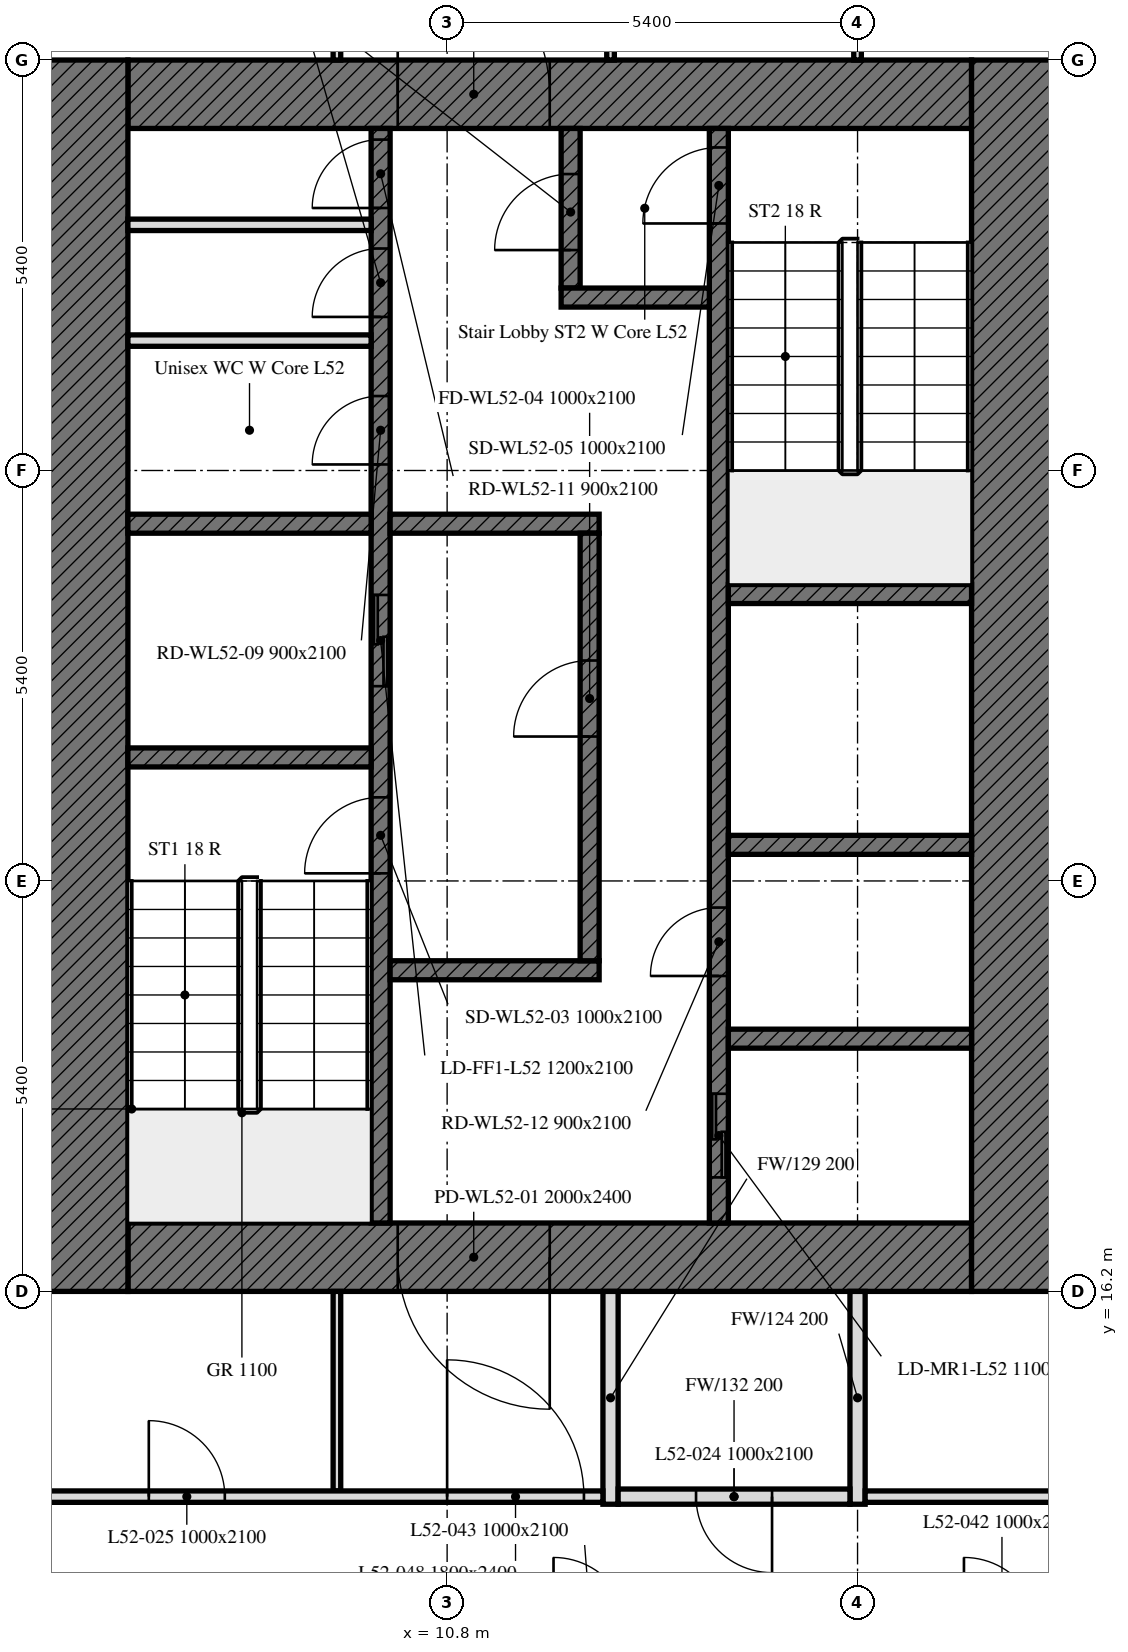
"""IFC4 building model, lengths in metres.
Left out: names, types, materials, properties, quantities, classifications, styles, units other than length and angle.
Written with IfcOpenShell. Run it as: python <this file> out.ifc"""

import sys

from ifc_helpers import new_model, si_unit, direction, frame, frame_2d, origin, place, context, subcontext, project, spatial, rectangle, extrude, element, fill, save


model = new_model("IFC4")
c1 = context("Model", 3, precision=1e-05, world=origin(), true_north=direction((0.0, 1.0)))
c2 = subcontext(c1, "Body", "Model", "MODEL_VIEW")
j1 = project(units=[si_unit("LENGTHUNIT", "METRE"), si_unit("PLANEANGLEUNIT", "RADIAN")], contexts=[c1])
p1 = place(None, origin())
s1 = spatial("IfcSite", under=j1, at=p1, CompositionType="ELEMENT")
p2 = place(p1, origin())
s2 = spatial("IfcBuilding", under=s1, at=p2, CompositionType="ELEMENT")
p3 = place(p2, frame((0.0, 0.0, 210.4)))
s3 = spatial("IfcBuildingStorey", under=s2, at=p3, CompositionType="ELEMENT", Elevation=210.4)
p4 = place(p3, frame((17.7, 16.65, 0.0), z_axis=(0.0, 0.0, 1.0), x_axis=(-1.0, 0.0, 0.0)))
e1 = element("IfcWall", 1, at=p4, inside=s3, PredefinedType="SOLIDWALL", context=c2, shape_type="SweptSolid", body=[
    extrude(rectangle(XDim=11.1, YDim=0.9, at=frame_2d((5.55, 0.0))), origin(), (0.0, 0.0, 1.0), 3.0),
])
p5 = place(p4, frame((5.55, 0.0, 0.0)))
e2 = element("IfcOpeningElement", 2, at=p5, cuts=e1, PredefinedType="OPENING", context=c2, shape_type="SweptSolid", body=[
    extrude(rectangle(XDim=2.0, YDim=2.4, at=frame_2d((1.0, 1.2))), frame((0.0, 0.45, 0.0), z_axis=(0.0, -1.0, 0.0), x_axis=(1.0, 0.0, 0.0)), (0.0, 0.0, 1.0), 0.9),
])
p6 = place(p3, frame((6.6, 31.95, 0.0), z_axis=(0.0, 0.0, 1.0), x_axis=(1.0, 0.0, 0.0)))
e3 = element("IfcWall", 3, at=p6, inside=s3, PredefinedType="SOLIDWALL", context=c2, shape_type="SweptSolid", body=[
    extrude(rectangle(XDim=11.1, YDim=0.9, at=frame_2d((5.55, 0.0))), origin(), (0.0, 0.0, 1.0), 3.0),
])
p7 = place(p6, frame((3.55, 0.0, 0.0)))
e4 = element("IfcOpeningElement", 4, at=p7, cuts=e3, PredefinedType="OPENING", context=c2, shape_type="SweptSolid", body=[
    extrude(rectangle(XDim=2.0, YDim=2.4, at=frame_2d((1.0, 1.2))), frame((0.0, 0.45, 0.0), z_axis=(0.0, -1.0, 0.0), x_axis=(1.0, 0.0, 0.0)), (0.0, 0.0, 1.0), 0.9),
])
for number, where, z_axis, x_axis in (
    (5, (6.0, 16.2, 0.0), (0.0, 0.0, 1.0), (0.0, 1.0, 0.0)),
    (6, (18.3, 32.4, 0.0), (0.0, 0.0, 1.0), (0.0, -1.0, 0.0)),
):
    element("IfcWall", number, at=place(p3, frame(where, z_axis=z_axis, x_axis=x_axis)), inside=s3, PredefinedType="SOLIDWALL", context=c2, shape_type="SweptSolid", body=[
        extrude(rectangle(XDim=16.2, YDim=1.2, at=frame_2d((8.1, 0.0))), origin(), (0.0, 0.0, 1.0), 3.0),
    ])
p8 = place(p3, frame((9.925, 17.1, 0.0), z_axis=(0.0, 0.0, 1.0), x_axis=(0.0, 1.0, 0.0)))
e7 = element("IfcWall", 7, at=p8, inside=s3, PredefinedType="SOLIDWALL", context=c2, shape_type="SweptSolid", body=[
    extrude(rectangle(XDim=14.4, YDim=0.25, at=frame_2d((7.2, 0.0))), origin(), (0.0, 0.0, 1.0), 3.0),
])
p9 = place(p8, frame((4.6, 0.0, 0.0)))
e8 = element("IfcOpeningElement", 8, at=p9, cuts=e7, PredefinedType="OPENING", context=c2, shape_type="SweptSolid", body=[
    extrude(rectangle(XDim=1.0, YDim=2.1, at=frame_2d((0.5, 1.05))), frame((0.0, 0.125, 0.0), z_axis=(0.0, -1.0, 0.0), x_axis=(1.0, 0.0, 0.0)), (0.0, 0.0, 1.0), 0.25),
])
p10 = place(p8, frame((7.062, 0.0, 0.0)))
e9 = element("IfcOpeningElement", 9, at=p10, cuts=e7, PredefinedType="OPENING", context=c2, shape_type="SweptSolid", body=[
    extrude(rectangle(XDim=1.2, YDim=2.1, at=frame_2d((0.6, 1.05))), frame((0.0, 0.125, 0.0), z_axis=(0.0, -1.0, 0.0), x_axis=(1.0, 0.0, 0.0)), (0.0, 0.0, 1.0), 0.25),
])
p11 = place(p8, frame((9.979, 0.0, 0.0)))
e10 = element("IfcOpeningElement", 10, at=p11, cuts=e7, PredefinedType="OPENING", context=c2, shape_type="SweptSolid", body=[
    extrude(rectangle(XDim=0.9, YDim=2.1, at=frame_2d((0.45, 1.05))), frame((0.0, 0.125, 0.0), z_axis=(0.0, -1.0, 0.0), x_axis=(1.0, 0.0, 0.0)), (0.0, 0.0, 1.0), 0.25),
])
p12 = place(p8, frame((11.92, 0.0, 0.0)))
e11 = element("IfcOpeningElement", 11, at=p12, cuts=e7, PredefinedType="OPENING", context=c2, shape_type="SweptSolid", body=[
    extrude(rectangle(XDim=0.9, YDim=2.1, at=frame_2d((0.45, 1.05))), frame((0.0, 0.125, 0.0), z_axis=(0.0, -1.0, 0.0), x_axis=(1.0, 0.0, 0.0)), (0.0, 0.0, 1.0), 0.25),
])
p13 = place(p8, frame((13.354, 0.0, 0.0)))
e12 = element("IfcOpeningElement", 12, at=p13, cuts=e7, PredefinedType="OPENING", context=c2, shape_type="SweptSolid", body=[
    extrude(rectangle(XDim=0.9, YDim=2.1, at=frame_2d((0.45, 1.05))), frame((0.0, 0.125, 0.0), z_axis=(0.0, -1.0, 0.0), x_axis=(1.0, 0.0, 0.0)), (0.0, 0.0, 1.0), 0.25),
])
p14 = place(p3, frame((14.375, 17.1, 0.0), z_axis=(0.0, 0.0, 1.0), x_axis=(0.0, 1.0, 0.0)))
e13 = element("IfcWall", 13, at=p14, inside=s3, PredefinedType="SOLIDWALL", context=c2, shape_type="SweptSolid", body=[
    extrude(rectangle(XDim=14.4, YDim=0.25, at=frame_2d((7.2, 0.0))), origin(), (0.0, 0.0, 1.0), 3.0),
])
p15 = place(p14, frame((13.15, 0.0, 0.0)))
e14 = element("IfcOpeningElement", 14, at=p15, cuts=e13, PredefinedType="OPENING", context=c2, shape_type="SweptSolid", body=[
    extrude(rectangle(XDim=1.0, YDim=2.1, at=frame_2d((0.5, 1.05))), frame((0.0, 0.125, 0.0), z_axis=(0.0, -1.0, 0.0), x_axis=(1.0, 0.0, 0.0)), (0.0, 0.0, 1.0), 0.25),
])
p16 = place(p14, frame((0.6, 0.0, 0.0)))
e15 = element("IfcOpeningElement", 15, at=p16, cuts=e13, PredefinedType="OPENING", context=c2, shape_type="SweptSolid", body=[
    extrude(rectangle(XDim=1.1, YDim=2.1, at=frame_2d((0.55, 1.05))), frame((0.0, 0.125, 0.0), z_axis=(0.0, -1.0, 0.0), x_axis=(1.0, 0.0, 0.0)), (0.0, 0.0, 1.0), 0.25),
])
p17 = place(p14, frame((3.25, 0.0, 0.0)))
e16 = element("IfcOpeningElement", 16, at=p17, cuts=e13, PredefinedType="OPENING", context=c2, shape_type="SweptSolid", body=[
    extrude(rectangle(XDim=0.9, YDim=2.1, at=frame_2d((0.45, 1.05))), frame((0.0, 0.125, 0.0), z_axis=(0.0, -1.0, 0.0), x_axis=(1.0, 0.0, 0.0)), (0.0, 0.0, 1.0), 0.25),
])
for number, where, z_axis, x_axis in (
    (17, (6.6, 23.225, 0.0), (0.0, 0.0, 1.0), (1.0, 0.0, 0.0)),
    (18, (14.5, 25.375, 0.0), (0.0, 0.0, 1.0), (1.0, 0.0, 0.0)),
    (19, (14.5, 22.075, 0.0), (0.0, 0.0, 1.0), (1.0, 0.0, 0.0)),
    (20, (6.6, 26.3, 0.0), (0.0, 0.0, 1.0), (1.0, 0.0, 0.0)),
):
    element("IfcWall", number, at=place(p3, frame(where, z_axis=z_axis, x_axis=x_axis)), inside=s3, PredefinedType="SOLIDWALL", context=c2, shape_type="SweptSolid", body=[
        extrude(rectangle(XDim=3.2, YDim=0.25, at=frame_2d((1.6, 0.0))), origin(), (0.0, 0.0, 1.0), 3.0),
    ])
for number, where, z_axis, x_axis in (
    (21, (10.05, 26.3, 0.0), (0.0, 0.0, 1.0), (1.0, 0.0, 0.0)),
    (22, (10.05, 20.425, 0.0), (0.0, 0.0, 1.0), (1.0, 0.0, 0.0)),
):
    element("IfcWall", number, at=place(p3, frame(where, z_axis=z_axis, x_axis=x_axis)), inside=s3, PredefinedType="SOLIDWALL", context=c2, shape_type="SweptSolid", body=[
        extrude(rectangle(XDim=2.75, YDim=0.25, at=frame_2d((1.375, 0.0))), origin(), (0.0, 0.0, 1.0), 3.0),
    ])
p18 = place(p3, frame((12.425, 29.4, 0.0), z_axis=(0.0, 0.0, 1.0), x_axis=(0.0, 1.0, 0.0)))
e23 = element("IfcWall", 23, at=p18, inside=s3, PredefinedType="SOLIDWALL", context=c2, shape_type="SweptSolid", body=[
    extrude(rectangle(XDim=2.1, YDim=0.25, at=frame_2d((1.05, 0.0))), origin(), (0.0, 0.0, 1.0), 3.0),
])
p19 = place(p18, frame((0.5, 0.0, 0.0)))
e24 = element("IfcOpeningElement", 24, at=p19, cuts=e23, PredefinedType="OPENING", context=c2, shape_type="SweptSolid", body=[
    extrude(rectangle(XDim=1.0, YDim=2.1, at=frame_2d((0.5, 1.05))), frame((0.0, 0.125, 0.0), z_axis=(0.0, -1.0, 0.0), x_axis=(1.0, 0.0, 0.0)), (0.0, 0.0, 1.0), 0.25),
])
p20 = place(p3, frame((12.3, 29.275, 0.0), z_axis=(0.0, 0.0, 1.0), x_axis=(1.0, 0.0, 0.0)))
e25 = element("IfcWall", 25, at=p20, inside=s3, PredefinedType="SOLIDWALL", context=c2, shape_type="SweptSolid", body=[
    extrude(rectangle(XDim=1.95, YDim=0.25, at=frame_2d((0.975, 0.0))), origin(), (0.0, 0.0, 1.0), 3.0),
])
p21 = place(p3, frame((12.675, 20.55, 0.0), z_axis=(0.0, 0.0, 1.0), x_axis=(0.0, 1.0, 0.0)))
e26 = element("IfcWall", 26, at=p21, inside=s3, PredefinedType="SOLIDWALL", context=c2, shape_type="SweptSolid", body=[
    extrude(rectangle(XDim=5.625, YDim=0.25, at=frame_2d((2.812, 0.0))), origin(), (0.0, 0.0, 1.0), 3.0),
])
p22 = place(p21, frame((2.95, 0.0, 0.0)))
e27 = element("IfcOpeningElement", 27, at=p22, cuts=e26, PredefinedType="OPENING", context=c2, shape_type="SweptSolid", body=[
    extrude(rectangle(XDim=1.0, YDim=2.1, at=frame_2d((0.5, 1.05))), frame((0.0, 0.125, 0.0), z_axis=(0.0, -1.0, 0.0), x_axis=(1.0, 0.0, 0.0)), (0.0, 0.0, 1.0), 0.25),
])
p23 = place(p3, frame((14.5, 19.525, 0.0), z_axis=(0.0, 0.0, 1.0), x_axis=(1.0, 0.0, 0.0)))
e28 = element("IfcWall", 28, at=p23, inside=s3, PredefinedType="SOLIDWALL", context=c2, shape_type="SweptSolid", body=[
    extrude(rectangle(XDim=3.2, YDim=0.25, at=frame_2d((1.6, 0.0))), origin(), (0.0, 0.0, 1.0), 3.0),
])
for number, where, z_axis, x_axis in (
    (29, (6.6, 28.709, 0.0), (0.0, 0.0, 1.0), (1.0, 0.0, 0.0)),
    (30, (6.6, 30.232, 0.0), (0.0, 0.0, 1.0), (1.0, 0.0, 0.0)),
):
    element("IfcWall", number, at=place(p3, frame(where, z_axis=z_axis, x_axis=x_axis)), inside=s3, PredefinedType="PARTITIONING", context=c2, shape_type="SweptSolid", body=[
        extrude(rectangle(XDim=3.2, YDim=0.15, at=frame_2d((1.6, 0.0))), origin(), (0.0, 0.0, 1.0), 3.0),
    ])
p24 = place(p3, frame((16.2, 37.405, 0.0), z_axis=(0.0, 0.0, 1.0), x_axis=(0.0, -1.0, 0.0)))
e31 = element("IfcWall", 31, at=p24, inside=s3, PredefinedType="PARTITIONING", context=c2, shape_type="SweptSolid", body=[
    extrude(rectangle(XDim=5.005, YDim=0.1, at=frame_2d((2.502, 0.0))), origin(), (0.0, 0.0, 1.0), 2.4),
])
for number, where, z_axis, x_axis in (
    (32, (12.95, 32.4, 0.0), (0.0, 0.0, 1.0), (0.0, 1.0, 0.0)),
    (33, (9.35, 38.175, 0.0), (0.0, 0.0, 1.0), (0.0, -1.0, 0.0)),
):
    element("IfcWall", number, at=place(p3, frame(where, z_axis=z_axis, x_axis=x_axis)), inside=s3, PredefinedType="PARTITIONING", context=c2, shape_type="SweptSolid", body=[
        extrude(rectangle(XDim=5.775, YDim=0.1, at=frame_2d((2.888, 0.0))), origin(), (0.0, 0.0, 1.0), 2.4),
    ])
for number, where, z_axis, x_axis in (
    (34, (16.2, 16.2, 0.0), (0.0, 0.0, 1.0), (0.0, -1.0, 0.0)),
    (35, (12.95, 13.4, 0.0), (0.0, 0.0, 1.0), (0.0, 1.0, 0.0)),
):
    element("IfcWall", number, at=place(p3, frame(where, z_axis=z_axis, x_axis=x_axis)), inside=s3, PredefinedType="PARTITIONING", context=c2, shape_type="SweptSolid", body=[
        extrude(rectangle(XDim=2.8, YDim=0.2, at=frame_2d((1.4, 0.0))), origin(), (0.0, 0.0, 1.0), 3.0),
    ])
p25 = place(p3, frame((9.35, 16.2, 0.0), z_axis=(0.0, 0.0, 1.0), x_axis=(0.0, -1.0, 0.0)))
e36 = element("IfcWall", 36, at=p25, inside=s3, PredefinedType="PARTITIONING", context=c2, shape_type="SweptSolid", body=[
    extrude(rectangle(XDim=2.625, YDim=0.1, at=frame_2d((1.312, 0.0))), origin(), (0.0, 0.0, 1.0), 3.0),
])
p26 = place(p3, frame((16.3, 13.5, 0.0), z_axis=(0.0, 0.0, 1.0), x_axis=(1.0, 0.0, 0.0)))
e37 = element("IfcWall", 37, at=p26, inside=s3, PredefinedType="PARTITIONING", context=c2, shape_type="SweptSolid", body=[
    extrude(rectangle(XDim=26.149, YDim=0.15, at=frame_2d((13.074, 0.0))), origin(), (0.0, 0.0, 1.0), 3.0),
])
p27 = place(p26, frame((7.5, 0.0, 0.0)))
e38 = element("IfcOpeningElement", 38, at=p27, cuts=e37, PredefinedType="OPENING", context=c2, shape_type="SweptSolid", body=[
    extrude(rectangle(XDim=1.0, YDim=2.1, at=frame_2d((0.5, 1.05))), frame((0.0, 0.075, 0.0), z_axis=(0.0, -1.0, 0.0), x_axis=(1.0, 0.0, 0.0)), (0.0, 0.0, 1.0), 0.15),
])
p28 = place(p26, frame((23.12, 0.0, 0.0)))
e39 = element("IfcOpeningElement", 39, at=p28, cuts=e37, PredefinedType="OPENING", context=c2, shape_type="SweptSolid", body=[
    extrude(rectangle(XDim=1.0, YDim=2.1, at=frame_2d((0.5, 1.05))), frame((0.0, 0.075, 0.0), z_axis=(0.0, -1.0, 0.0), x_axis=(1.0, 0.0, 0.0)), (0.0, 0.0, 1.0), 0.15),
])
p29 = place(p26, frame((17.225, 0.0, 0.0)))
e40 = element("IfcOpeningElement", 40, at=p29, cuts=e37, PredefinedType="OPENING", context=c2, shape_type="SweptSolid", body=[
    extrude(rectangle(XDim=1.0, YDim=2.1, at=frame_2d((0.5, 1.05))), frame((0.0, 0.075, 0.0), z_axis=(0.0, -1.0, 0.0), x_axis=(1.0, 0.0, 0.0)), (0.0, 0.0, 1.0), 0.15),
])
p30 = place(p26, frame((19.65, 0.0, 0.0)))
e41 = element("IfcOpeningElement", 41, at=p30, cuts=e37, PredefinedType="OPENING", context=c2, shape_type="SweptSolid", body=[
    extrude(rectangle(XDim=1.8, YDim=2.4, at=frame_2d((0.9, 1.2))), frame((0.0, 0.075, 0.0), z_axis=(0.0, -1.0, 0.0), x_axis=(1.0, 0.0, 0.0)), (0.0, 0.0, 1.0), 0.15),
])
p31 = place(p3, frame((16.1, 13.5, 0.0), z_axis=(0.0, 0.0, 1.0), x_axis=(-1.0, 0.0, 0.0)))
e42 = element("IfcWall", 42, at=p31, inside=s3, PredefinedType="PARTITIONING", context=c2, shape_type="SweptSolid", body=[
    extrude(rectangle(XDim=3.05, YDim=0.2, at=frame_2d((1.525, 0.0))), origin(), (0.0, 0.0, 1.0), 3.0),
])
p32 = place(p31, frame((1.025, 0.0, 0.0)))
e43 = element("IfcOpeningElement", 43, at=p32, cuts=e42, PredefinedType="OPENING", context=c2, shape_type="SweptSolid", body=[
    extrude(rectangle(XDim=1.0, YDim=2.1, at=frame_2d((0.5, 1.05))), frame((0.0, 0.1, 0.0), z_axis=(0.0, -1.0, 0.0), x_axis=(1.0, 0.0, 0.0)), (0.0, 0.0, 1.0), 0.2),
])
p33 = place(p3, frame((5.325, 13.5, 0.0), z_axis=(0.0, 0.0, 1.0), x_axis=(1.0, 0.0, 0.0)))
e44 = element("IfcWall", 44, at=p33, inside=s3, PredefinedType="PARTITIONING", context=c2, shape_type="SweptSolid", body=[
    extrude(rectangle(XDim=7.525, YDim=0.15, at=frame_2d((3.763, 0.0))), origin(), (0.0, 0.0, 1.0), 3.0),
])
p34 = place(p33, frame((1.55, 0.0, 0.0)))
e45 = element("IfcOpeningElement", 45, at=p34, cuts=e44, PredefinedType="OPENING", context=c2, shape_type="SweptSolid", body=[
    extrude(rectangle(XDim=1.0, YDim=2.1, at=frame_2d((0.5, 1.05))), frame((0.0, 0.075, 0.0), z_axis=(0.0, -1.0, 0.0), x_axis=(1.0, 0.0, 0.0)), (0.0, 0.0, 1.0), 0.15),
])
p35 = place(p33, frame((5.475, 0.0, 0.0)))
e46 = element("IfcOpeningElement", 46, at=p35, cuts=e44, PredefinedType="OPENING", context=c2, shape_type="SweptSolid", body=[
    extrude(rectangle(XDim=1.8, YDim=2.4, at=frame_2d((0.9, 1.2))), frame((0.0, 0.075, 0.0), z_axis=(0.0, -1.0, 0.0), x_axis=(1.0, 0.0, 0.0)), (0.0, 0.0, 1.0), 0.15),
])
p36 = place(p5, origin())
e47 = element("IfcDoor", 47, at=p36, inside=s3, OperationType="DOUBLE_DOOR_SINGLE_SWING", PredefinedType="DOOR", context=c2, shape_type="SweptSolid", body=[
    extrude(rectangle(XDim=2.0, YDim=2.4, at=frame_2d((1.0, 1.2))), frame((0.0, 0.025, 0.0), z_axis=(0.0, -1.0, 0.0), x_axis=(1.0, 0.0, 0.0)), (0.0, 0.0, 1.0), 0.05),
])
fill(e2, e47)
p37 = place(p7, origin())
e48 = element("IfcDoor", 48, at=p37, inside=s3, OperationType="DOUBLE_DOOR_SINGLE_SWING", PredefinedType="DOOR", context=c2, shape_type="SweptSolid", body=[
    extrude(rectangle(XDim=2.0, YDim=2.4, at=frame_2d((1.0, 1.2))), frame((0.0, 0.025, 0.0), z_axis=(0.0, -1.0, 0.0), x_axis=(1.0, 0.0, 0.0)), (0.0, 0.0, 1.0), 0.05),
])
fill(e4, e48)
p38 = place(p9, origin())
e49 = element("IfcDoor", 49, at=p38, inside=s3, OperationType="SINGLE_SWING_LEFT", PredefinedType="DOOR", context=c2, shape_type="SweptSolid", body=[
    extrude(rectangle(XDim=1.0, YDim=2.1, at=frame_2d((0.5, 1.05))), frame((0.0, 0.025, 0.0), z_axis=(0.0, -1.0, 0.0), x_axis=(1.0, 0.0, 0.0)), (0.0, 0.0, 1.0), 0.05),
])
fill(e8, e49)
p39 = place(p22, origin())
e50 = element("IfcDoor", 50, at=p39, inside=s3, OperationType="SINGLE_SWING_LEFT", PredefinedType="DOOR", context=c2, shape_type="SweptSolid", body=[
    extrude(rectangle(XDim=1.0, YDim=2.1, at=frame_2d((0.5, 1.05))), frame((0.0, 0.025, 0.0), z_axis=(0.0, -1.0, 0.0), x_axis=(1.0, 0.0, 0.0)), (0.0, 0.0, 1.0), 0.05),
])
fill(e27, e50)
p40 = place(p15, origin())
e51 = element("IfcDoor", 51, at=p40, inside=s3, OperationType="SINGLE_SWING_LEFT", PredefinedType="DOOR", context=c2, shape_type="SweptSolid", body=[
    extrude(rectangle(XDim=1.0, YDim=2.1, at=frame_2d((0.5, 1.05))), frame((0.0, 0.025, 0.0), z_axis=(0.0, -1.0, 0.0), x_axis=(1.0, 0.0, 0.0)), (0.0, 0.0, 1.0), 0.05),
])
fill(e14, e51)
p41 = place(p19, origin())
e52 = element("IfcDoor", 52, at=p41, inside=s3, OperationType="SINGLE_SWING_LEFT", PredefinedType="DOOR", context=c2, shape_type="SweptSolid", body=[
    extrude(rectangle(XDim=1.0, YDim=2.1, at=frame_2d((0.5, 1.05))), frame((0.0, 0.025, 0.0), z_axis=(0.0, -1.0, 0.0), x_axis=(1.0, 0.0, 0.0)), (0.0, 0.0, 1.0), 0.05),
])
fill(e24, e52)
p42 = place(p10, origin())
e53 = element("IfcDoor", 53, at=p42, inside=s3, OperationType="DOUBLE_DOOR_SLIDING", PredefinedType="DOOR", context=c2, shape_type="SweptSolid", body=[
    extrude(rectangle(XDim=1.2, YDim=2.1, at=frame_2d((0.6, 1.05))), frame((0.0, 0.025, 0.0), z_axis=(0.0, -1.0, 0.0), x_axis=(1.0, 0.0, 0.0)), (0.0, 0.0, 1.0), 0.05),
])
fill(e9, e53)
p43 = place(p16, origin())
e54 = element("IfcDoor", 54, at=p43, inside=s3, OperationType="DOUBLE_DOOR_SLIDING", PredefinedType="DOOR", context=c2, shape_type="SweptSolid", body=[
    extrude(rectangle(XDim=1.1, YDim=2.1, at=frame_2d((0.55, 1.05))), frame((0.0, 0.025, 0.0), z_axis=(0.0, -1.0, 0.0), x_axis=(1.0, 0.0, 0.0)), (0.0, 0.0, 1.0), 0.05),
])
fill(e15, e54)
p44 = place(p11, origin())
e55 = element("IfcDoor", 55, at=p44, inside=s3, OperationType="SINGLE_SWING_LEFT", PredefinedType="DOOR", context=c2, shape_type="SweptSolid", body=[
    extrude(rectangle(XDim=0.9, YDim=2.1, at=frame_2d((0.45, 1.05))), frame((0.0, 0.025, 0.0), z_axis=(0.0, -1.0, 0.0), x_axis=(1.0, 0.0, 0.0)), (0.0, 0.0, 1.0), 0.05),
])
fill(e10, e55)
p45 = place(p12, origin())
e56 = element("IfcDoor", 56, at=p45, inside=s3, OperationType="SINGLE_SWING_LEFT", PredefinedType="DOOR", context=c2, shape_type="SweptSolid", body=[
    extrude(rectangle(XDim=0.9, YDim=2.1, at=frame_2d((0.45, 1.05))), frame((0.0, 0.025, 0.0), z_axis=(0.0, -1.0, 0.0), x_axis=(1.0, 0.0, 0.0)), (0.0, 0.0, 1.0), 0.05),
])
fill(e11, e56)
p46 = place(p13, origin())
e57 = element("IfcDoor", 57, at=p46, inside=s3, OperationType="SINGLE_SWING_LEFT", PredefinedType="DOOR", context=c2, shape_type="SweptSolid", body=[
    extrude(rectangle(XDim=0.9, YDim=2.1, at=frame_2d((0.45, 1.05))), frame((0.0, 0.025, 0.0), z_axis=(0.0, -1.0, 0.0), x_axis=(1.0, 0.0, 0.0)), (0.0, 0.0, 1.0), 0.05),
])
fill(e12, e57)
p47 = place(p17, origin())
e58 = element("IfcDoor", 58, at=p47, inside=s3, OperationType="SINGLE_SWING_LEFT", PredefinedType="DOOR", context=c2, shape_type="SweptSolid", body=[
    extrude(rectangle(XDim=0.9, YDim=2.1, at=frame_2d((0.45, 1.05))), frame((0.0, 0.025, 0.0), z_axis=(0.0, -1.0, 0.0), x_axis=(1.0, 0.0, 0.0)), (0.0, 0.0, 1.0), 0.05),
])
fill(e16, e58)
p48 = place(p32, origin())
e59 = element("IfcDoor", 59, at=p48, inside=s3, OperationType="SINGLE_SWING_LEFT", PredefinedType="DOOR", context=c2, shape_type="SweptSolid", body=[
    extrude(rectangle(XDim=1.0, YDim=2.1, at=frame_2d((0.5, 1.05))), frame((0.0, 0.025, 0.0), z_axis=(0.0, -1.0, 0.0), x_axis=(1.0, 0.0, 0.0)), (0.0, 0.0, 1.0), 0.05),
])
fill(e43, e59)
p49 = place(p34, origin())
e60 = element("IfcDoor", 60, at=p49, inside=s3, OperationType="SINGLE_SWING_RIGHT", PredefinedType="DOOR", context=c2, shape_type="SweptSolid", body=[
    extrude(rectangle(XDim=1.0, YDim=2.1, at=frame_2d((0.5, 1.05))), frame((0.0, 0.025, 0.0), z_axis=(0.0, -1.0, 0.0), x_axis=(1.0, 0.0, 0.0)), (0.0, 0.0, 1.0), 0.05),
])
fill(e45, e60)
p50 = place(p35, origin())
e61 = element("IfcDoor", 61, at=p50, inside=s3, OperationType="DOUBLE_DOOR_SINGLE_SWING", PredefinedType="DOOR", context=c2, shape_type="SweptSolid", body=[
    extrude(rectangle(XDim=1.8, YDim=2.4, at=frame_2d((0.9, 1.2))), frame((0.0, 0.025, 0.0), z_axis=(0.0, -1.0, 0.0), x_axis=(1.0, 0.0, 0.0)), (0.0, 0.0, 1.0), 0.05),
])
fill(e46, e61)
save(model, sys.argv[1])
